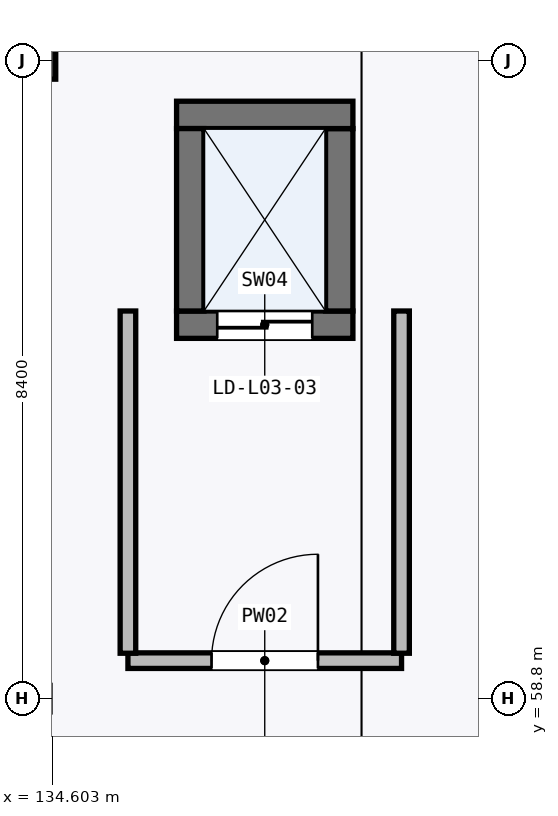
"""IFC4 building model, lengths in metres.
Left out: names, types, materials, properties, quantities, classifications, styles, units other than length and angle.
Written with IfcOpenShell. Run it as: python <this file> out.ifc"""

import sys

from ifc_helpers import new_model, si_unit, direction, frame, frame_2d, origin, origin_2d, place, context, subcontext, project, spatial, rectangle, hollow_rectangle, extrude, element, fill, save


model = new_model("IFC4")
c1 = context("Model", 3, precision=1e-05, world=origin(), true_north=direction((0.0, 1.0)))
c2 = subcontext(c1, "Body", "Model", "MODEL_VIEW")
j1 = project(units=[si_unit("LENGTHUNIT", "METRE"), si_unit("PLANEANGLEUNIT", "RADIAN")], contexts=[c1])
p1 = place(None, origin())
s1 = spatial("IfcSite", under=j1, at=p1, CompositionType="ELEMENT")
p2 = place(p1, origin())
s2 = spatial("IfcBuilding", under=s1, at=p2, CompositionType="ELEMENT")
p3 = place(p2, frame((0.0, 0.0, 11.4)))
s3 = spatial("IfcBuildingStorey", under=s2, at=p3, CompositionType="ELEMENT", Elevation=11.4)
p4 = place(p3, frame((134.4, 67.2, 0.0), z_axis=(0.0, 0.0, 1.0), x_axis=(1.0, 0.0, 0.0)))
e1 = element("IfcColumn", 1, at=p4, inside=s3, PredefinedType="COLUMN", context=c2, shape_type="SweptSolid", body=[
    extrude(hollow_rectangle(XDim=0.5, YDim=0.5, WallThickness=0.02, at=origin_2d()), origin(), (0.0, 0.0, 1.0), 5.1),
])
p5 = place(p3, frame((136.24, 63.72, 0.0), z_axis=(0.0, 0.0, 1.0), x_axis=(1.0, 0.0, 0.0)))
e2 = element("IfcWall", 2, at=p5, inside=s3, PredefinedType="SHEAR", context=c2, shape_type="SweptSolid", body=[
    extrude(rectangle(XDim=2.32, YDim=0.36, at=frame_2d((1.16, 0.0))), origin(), (0.0, 0.0, 1.0), 4.845),
])
p6 = place(p5, frame((0.535, 0.0, 0.0)))
e3 = element("IfcOpeningElement", 3, at=p6, cuts=e2, PredefinedType="OPENING", context=c2, shape_type="SweptSolid", body=[
    extrude(rectangle(XDim=1.25, YDim=2.2, at=frame_2d((0.625, 1.1))), frame((0.0, 0.19, 0.0), z_axis=(0.0, -1.0, 0.0), x_axis=(1.0, 0.0, 0.0)), (0.0, 0.0, 1.0), 0.38),
])
p7 = place(p3, frame((138.38, 63.9, 0.0), z_axis=(0.0, 0.0, 1.0), x_axis=(0.0, 1.0, 0.0)))
e4 = element("IfcWall", 4, at=p7, inside=s3, PredefinedType="SHEAR", context=c2, shape_type="SweptSolid", body=[
    extrude(rectangle(XDim=2.4, YDim=0.36, at=frame_2d((1.2, 0.0))), origin(), (0.0, 0.0, 1.0), 4.845),
])
p8 = place(p3, frame((138.56, 66.48, 0.0), z_axis=(0.0, 0.0, 1.0), x_axis=(-1.0, 0.0, 0.0)))
e5 = element("IfcWall", 5, at=p8, inside=s3, PredefinedType="SHEAR", context=c2, shape_type="SweptSolid", body=[
    extrude(rectangle(XDim=2.32, YDim=0.36, at=frame_2d((1.16, 0.0))), origin(), (0.0, 0.0, 1.0), 4.845),
])
p9 = place(p3, frame((136.42, 66.3, 0.0), z_axis=(0.0, 0.0, 1.0), x_axis=(0.0, -1.0, 0.0)))
e6 = element("IfcWall", 6, at=p9, inside=s3, PredefinedType="SHEAR", context=c2, shape_type="SweptSolid", body=[
    extrude(rectangle(XDim=2.4, YDim=0.36, at=frame_2d((1.2, 0.0))), origin(), (0.0, 0.0, 1.0), 4.845),
])
p10 = place(p3, frame((135.6, 59.3, 0.0), z_axis=(0.0, 0.0, 1.0), x_axis=(1.0, 0.0, 0.0)))
e7 = element("IfcWall", 7, at=p10, inside=s3, PredefinedType="PARTITIONING", context=c2, shape_type="SweptSolid", body=[
    extrude(rectangle(XDim=3.6, YDim=0.205, at=frame_2d((1.8, 0.0))), origin(), (0.0, 0.0, 1.0), 4.845),
])
p11 = place(p10, frame((1.1, 0.0, 0.0)))
e8 = element("IfcOpeningElement", 8, at=p11, cuts=e7, PredefinedType="OPENING", context=c2, shape_type="SweptSolid", body=[
    extrude(rectangle(XDim=1.4, YDim=2.15, at=frame_2d((0.7, 1.075))), frame((0.0, 0.113, 0.0), z_axis=(0.0, -1.0, 0.0), x_axis=(1.0, 0.0, 0.0)), (0.0, 0.0, 1.0), 0.225),
])
for number, where, z_axis, x_axis in (
    (9, (139.2, 59.397, 0.0), (0.0, 0.0, 1.0), (0.0, 1.0, 0.0)),
    (10, (135.6, 63.9, 0.0), (0.0, 0.0, 1.0), (0.0, -1.0, 0.0)),
):
    element("IfcWall", number, at=place(p3, frame(where, z_axis=z_axis, x_axis=x_axis)), inside=s3, PredefinedType="PARTITIONING", context=c2, shape_type="SweptSolid", body=[
        extrude(rectangle(XDim=4.502, YDim=0.205, at=frame_2d((2.251, 0.0))), origin(), (0.0, 0.0, 1.0), 4.845),
    ])
p12 = place(p6, frame((1.25, 0.0, 0.0), z_axis=(0.0, 0.0, 1.0), x_axis=(-1.0, 0.0, 0.0)))
e11 = element("IfcDoor", 11, at=p12, inside=s3, OperationType="DOUBLE_DOOR_SLIDING", PredefinedType="DOOR", context=c2, shape_type="SweptSolid", body=[
    extrude(rectangle(XDim=1.25, YDim=2.2, at=frame_2d((0.625, 1.1))), frame((0.0, 0.025, 0.0), z_axis=(0.0, -1.0, 0.0), x_axis=(1.0, 0.0, 0.0)), (0.0, 0.0, 1.0), 0.05),
])
fill(e3, e11)
p13 = place(p11, origin())
e12 = element("IfcDoor", 12, at=p13, inside=s3, OperationType="SINGLE_SWING_RIGHT", PredefinedType="DOOR", context=c2, shape_type="SweptSolid", body=[
    extrude(rectangle(XDim=1.4, YDim=2.15, at=frame_2d((0.7, 1.075))), frame((0.0, 0.025, 0.0), z_axis=(0.0, -1.0, 0.0), x_axis=(1.0, 0.0, 0.0)), (0.0, 0.0, 1.0), 0.05),
])
fill(e8, e12)
save(model, sys.argv[1])
